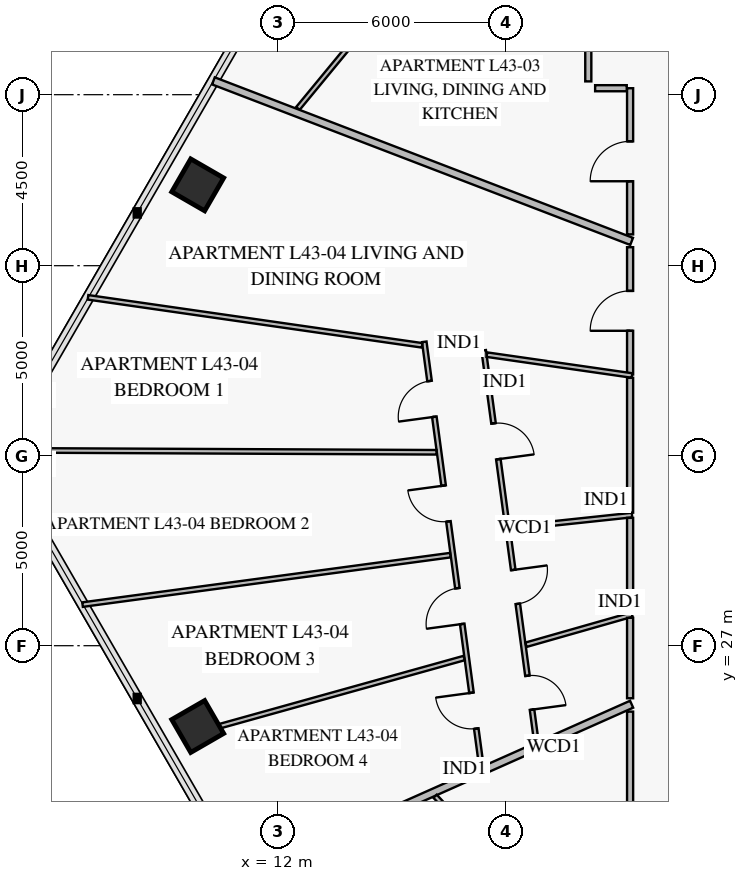
"""IFC4 building model, lengths in metres.
Left out: names, types, materials, properties, quantities, classifications, styles, units other than length and angle.
Written with IfcOpenShell. Run it as: python <this file> out.ifc"""

import sys

from ifc_helpers import new_model, si_unit, direction, frame, frame_2d, origin, origin_2d, place, context, subcontext, project, spatial, rectangle, extrude, element, fill, save


model = new_model("IFC4")
c1 = context("Model", 3, precision=1e-05, world=origin(), true_north=direction((0.0, 1.0)))
c2 = subcontext(c1, "Body", "Model", "MODEL_VIEW")
j1 = project(units=[si_unit("LENGTHUNIT", "METRE"), si_unit("PLANEANGLEUNIT", "RADIAN")], contexts=[c1])
p1 = place(None, origin())
s1 = spatial("IfcSite", under=j1, at=p1, CompositionType="ELEMENT")
p2 = place(p1, origin())
s2 = spatial("IfcBuilding", under=s1, at=p2, CompositionType="ELEMENT")
p3 = place(p2, frame((0.0, 0.0, 173.2)))
s3 = spatial("IfcBuildingStorey", under=s2, at=p3, CompositionType="ELEMENT", Elevation=173.2)
for number, where, z_axis, x_axis in (
    (1, (9.892, 39.126, 0.0), (0.0, 0.0, 1.0), (-0.5, -0.866, 0.0)),
    (2, (9.892, 24.874, 0.0), (0.0, 0.0, 1.0), (0.5, -0.866, 0.0)),
):
    element("IfcColumn", number, at=place(p3, frame(where, z_axis=z_axis, x_axis=x_axis)), inside=s3, PredefinedType="COLUMN", context=c2, shape_type="SweptSolid", body=[
        extrude(rectangle(XDim=1.0, YDim=1.0, at=origin_2d()), origin(), (0.0, 0.0, 1.0), 3.55),
    ])
p4 = place(p3, frame((19.43, 49.509, 0.0), z_axis=(0.0, 0.0, 1.0), x_axis=(-0.636077930037, -0.771624822643, 0.0)))
e3 = element("IfcWall", 3, at=p4, inside=s3, PredefinedType="PARTITIONING", context=c2, shape_type="SweptSolid", body=[
    extrude(rectangle(XDim=10.848, YDim=0.12, at=frame_2d((5.424, 0.0))), origin(), (0.0, 0.0, 1.0), 2.9),
])
p5 = place(p4, frame((4.949, 0.0, 0.0)))
e4 = element("IfcOpeningElement", 4, at=p5, cuts=e3, PredefinedType="OPENING", context=c2, shape_type="SweptSolid", body=[
    extrude(rectangle(XDim=0.95, YDim=2.1, at=frame_2d((0.475, 1.05))), frame((0.0, 0.072, 0.0), z_axis=(0.0, -1.0, 0.0), x_axis=(1.0, 0.0, 0.0)), (0.0, 0.0, 1.0), 0.144),
])
p6 = place(p3, frame((21.27, 41.67, 0.0), z_axis=(0.0, 0.0, 1.0), x_axis=(0.0, -1.0, 0.0)))
e5 = element("IfcWall", 5, at=p6, inside=s3, PredefinedType="PARTITIONING", context=c2, shape_type="SweptSolid", body=[
    extrude(rectangle(XDim=3.846, YDim=0.16, at=frame_2d((1.923, 0.0))), origin(), (0.0, 0.0, 1.0), 3.55),
])
p7 = place(p6, frame((1.398, 0.0, 0.0)))
e6 = element("IfcOpeningElement", 6, at=p7, cuts=e5, PredefinedType="OPENING", context=c2, shape_type="SweptSolid", body=[
    extrude(rectangle(XDim=1.05, YDim=2.15, at=frame_2d((0.525, 1.075))), frame((0.0, 0.092, 0.0), z_axis=(0.0, -1.0, 0.0), x_axis=(1.0, 0.0, 0.0)), (0.0, 0.0, 1.0), 0.184),
])
p8 = place(p3, frame((17.418, 34.772, 0.0), z_axis=(0.0, 0.0, 1.0), x_axis=(0.133300793384, -0.991075627025, 0.0)))
e7 = element("IfcWall", 7, at=p8, inside=s3, PredefinedType="PARTITIONING", context=c2, shape_type="SweptSolid", body=[
    extrude(rectangle(XDim=10.449, YDim=0.12, at=frame_2d((5.224, 0.0))), origin(), (0.0, 0.0, 1.0), 2.9),
])
p9 = place(p8, frame((1.94, 0.0, 0.0)))
e8 = element("IfcOpeningElement", 8, at=p9, cuts=e7, PredefinedType="OPENING", context=c2, shape_type="SweptSolid", body=[
    extrude(rectangle(XDim=0.95, YDim=2.1, at=frame_2d((0.475, 1.05))), frame((0.0, 0.072, 0.0), z_axis=(0.0, -1.0, 0.0), x_axis=(1.0, 0.0, 0.0)), (0.0, 0.0, 1.0), 0.144),
])
p10 = place(p8, frame((5.831, 0.0, 0.0)))
e9 = element("IfcOpeningElement", 9, at=p10, cuts=e7, PredefinedType="OPENING", context=c2, shape_type="SweptSolid", body=[
    extrude(rectangle(XDim=0.9, YDim=2.1, at=frame_2d((0.45, 1.05))), frame((0.0, 0.072, 0.0), z_axis=(0.0, -1.0, 0.0), x_axis=(1.0, 0.0, 0.0)), (0.0, 0.0, 1.0), 0.144),
])
p11 = place(p8, frame((8.64, 0.0, 0.0)))
e10 = element("IfcOpeningElement", 10, at=p11, cuts=e7, PredefinedType="OPENING", context=c2, shape_type="SweptSolid", body=[
    extrude(rectangle(XDim=0.9, YDim=2.1, at=frame_2d((0.45, 1.05))), frame((0.0, 0.072, 0.0), z_axis=(0.0, -1.0, 0.0), x_axis=(1.0, 0.0, 0.0)), (0.0, 0.0, 1.0), 0.144),
])
p12 = place(p3, frame((15.854, 34.997, 0.0), z_axis=(0.0, 0.0, 1.0), x_axis=(0.133279106394, -0.991078543708, 0.0)))
e11 = element("IfcWall", 11, at=p12, inside=s3, PredefinedType="PARTITIONING", context=c2, shape_type="SweptSolid", body=[
    extrude(rectangle(XDim=11.311, YDim=0.12, at=frame_2d((5.656, 0.0))), origin(), (0.0, 0.0, 1.0), 2.9),
])
p13 = place(p12, frame((1.042, 0.0, 0.0)))
e12 = element("IfcOpeningElement", 12, at=p13, cuts=e11, PredefinedType="OPENING", context=c2, shape_type="SweptSolid", body=[
    extrude(rectangle(XDim=0.95, YDim=2.1, at=frame_2d((0.475, 1.05))), frame((0.0, 0.072, 0.0), z_axis=(0.0, -1.0, 0.0), x_axis=(1.0, 0.0, 0.0)), (0.0, 0.0, 1.0), 0.144),
])
p14 = place(p12, frame((3.819, 0.0, 0.0)))
e13 = element("IfcOpeningElement", 13, at=p14, cuts=e11, PredefinedType="OPENING", context=c2, shape_type="SweptSolid", body=[
    extrude(rectangle(XDim=0.95, YDim=2.1, at=frame_2d((0.475, 1.05))), frame((0.0, 0.072, 0.0), z_axis=(0.0, -1.0, 0.0), x_axis=(1.0, 0.0, 0.0)), (0.0, 0.0, 1.0), 0.144),
])
p15 = place(p12, frame((6.542, 0.0, 0.0)))
e14 = element("IfcOpeningElement", 14, at=p15, cuts=e11, PredefinedType="OPENING", context=c2, shape_type="SweptSolid", body=[
    extrude(rectangle(XDim=0.95, YDim=2.1, at=frame_2d((0.475, 1.05))), frame((0.0, 0.072, 0.0), z_axis=(0.0, -1.0, 0.0), x_axis=(1.0, 0.0, 0.0)), (0.0, 0.0, 1.0), 0.144),
])
p16 = place(p12, frame((9.32, 0.0, 0.0)))
e15 = element("IfcOpeningElement", 15, at=p16, cuts=e11, PredefinedType="OPENING", context=c2, shape_type="SweptSolid", body=[
    extrude(rectangle(XDim=0.95, YDim=2.1, at=frame_2d((0.475, 1.05))), frame((0.0, 0.072, 0.0), z_axis=(0.0, -1.0, 0.0), x_axis=(1.0, 0.0, 0.0)), (0.0, 0.0, 1.0), 0.144),
])
p17 = place(p3, frame((21.27, 37.486, 0.0), z_axis=(0.0, 0.0, 1.0), x_axis=(0.0, -1.0, 0.0)))
e16 = element("IfcWall", 16, at=p17, inside=s3, PredefinedType="PARTITIONING", context=c2, shape_type="SweptSolid", body=[
    extrude(rectangle(XDim=3.348, YDim=0.16, at=frame_2d((1.674, 0.0))), origin(), (0.0, 0.0, 1.0), 2.9),
])
p18 = place(p17, frame((1.149, 0.0, 0.0)))
e17 = element("IfcOpeningElement", 17, at=p18, cuts=e16, PredefinedType="OPENING", context=c2, shape_type="SweptSolid", body=[
    extrude(rectangle(XDim=1.05, YDim=2.15, at=frame_2d((0.525, 1.075))), frame((0.0, 0.092, 0.0), z_axis=(0.0, -1.0, 0.0), x_axis=(1.0, 0.0, 0.0)), (0.0, 0.0, 1.0), 0.184),
])
p19 = place(p3, frame((21.31, 37.639, 0.0), z_axis=(0.0, 0.0, 1.0), x_axis=(-0.93357709865, 0.358376618762, 0.0)))
e18 = element("IfcWall", 18, at=p19, inside=s3, PredefinedType="PARTITIONING", context=c2, shape_type="SweptSolid", body=[
    extrude(rectangle(XDim=11.787, YDim=0.2, at=frame_2d((5.894, 0.0))), origin(), (0.0, 0.0, 1.0), 2.87),
])
p20 = place(p3, frame((21.32, 30.438, 0.0), z_axis=(0.0, 0.0, 1.0), x_axis=(-0.994376869396, -0.105899204953, 0.0)))
e19 = element("IfcWall", 19, at=p20, inside=s3, PredefinedType="PARTITIONING", context=c2, shape_type="SweptSolid", body=[
    extrude(rectangle(XDim=3.223, YDim=0.12, at=frame_2d((1.611, 0.0))), origin(), (0.0, 0.0, 1.0), 3.55),
])
p21 = place(p3, frame((21.32, 27.819, 0.0), z_axis=(0.0, 0.0, 1.0), x_axis=(-0.961771119413, -0.273854548737, 0.0)))
e20 = element("IfcWall", 20, at=p21, inside=s3, PredefinedType="PARTITIONING", context=c2, shape_type="SweptSolid", body=[
    extrude(rectangle(XDim=2.903, YDim=0.12, at=frame_2d((1.451, 0.0))), origin(), (0.0, 0.0, 1.0), 2.9),
])
p22 = place(p3, frame((16.176, 32.09, 0.0), z_axis=(0.0, 0.0, 1.0), x_axis=(-0.999989631639, 0.004553747245, 0.0)))
e21 = element("IfcWall", 21, at=p22, inside=s3, PredefinedType="PARTITIONING", context=c2, shape_type="SweptSolid", body=[
    extrude(rectangle(XDim=11.044, YDim=0.12, at=frame_2d((5.522, 0.0))), origin(), (0.0, 0.0, 1.0), 2.87),
])
p23 = place(p3, frame((16.54, 29.383, 0.0), z_axis=(0.0, 0.0, 1.0), x_axis=(-0.991077690838, -0.133285448281, 0.0)))
e22 = element("IfcWall", 22, at=p23, inside=s3, PredefinedType="PARTITIONING", context=c2, shape_type="SweptSolid", body=[
    extrude(rectangle(XDim=9.765, YDim=0.12, at=frame_2d((4.882, 0.0))), origin(), (0.0, 0.0, 1.0), 2.87),
])
p24 = place(p3, frame((16.904, 26.676, 0.0), z_axis=(0.0, 0.0, 1.0), x_axis=(-0.963259527587, -0.26857230407, 0.0)))
e23 = element("IfcWall", 23, at=p24, inside=s3, PredefinedType="PARTITIONING", context=c2, shape_type="SweptSolid", body=[
    extrude(rectangle(XDim=6.74, YDim=0.12, at=frame_2d((3.37, 0.0))), origin(), (0.0, 0.0, 1.0), 2.9),
])
p25 = place(p3, frame((21.32, 34.11, 0.0), z_axis=(0.0, 0.0, 1.0), x_axis=(-0.989818700467, 0.142333903923, 0.0)))
e24 = element("IfcWall", 24, at=p25, inside=s3, PredefinedType="PARTITIONING", context=c2, shape_type="SweptSolid", body=[
    extrude(rectangle(XDim=3.858, YDim=0.12, at=frame_2d((1.929, 0.0))), origin(), (0.0, 0.0, 1.0), 3.55),
])
p26 = place(p3, frame((15.798, 34.904, 0.0), z_axis=(0.0, 0.0, 1.0), x_axis=(-0.989827080259, 0.142275616979, 0.0)))
e25 = element("IfcWall", 25, at=p26, inside=s3, PredefinedType="PARTITIONING", context=c2, shape_type="SweptSolid", body=[
    extrude(rectangle(XDim=8.882, YDim=0.12, at=frame_2d((4.441, 0.0))), origin(), (0.0, 0.0, 1.0), 2.87),
])
p27 = place(p3, frame((21.31, 25.46, 0.0), z_axis=(0.0, 0.0, 1.0), x_axis=(-0.913543837416, -0.406740282146, 0.0)))
e26 = element("IfcWall", 26, at=p27, inside=s3, PredefinedType="PARTITIONING", context=c2, shape_type="SweptSolid", body=[
    extrude(rectangle(XDim=11.253, YDim=0.2, at=frame_2d((5.626, 0.0))), origin(), (0.0, 0.0, 1.0), 2.87),
])
p28 = place(p3, frame((16.138, 23.039, 0.0), z_axis=(0.0, 0.0, 1.0), x_axis=(0.682000707563, -0.731351512532, 0.0)))
e27 = element("IfcWall", 27, at=p28, inside=s3, PredefinedType="PARTITIONING", context=c2, shape_type="SweptSolid", body=[
    extrude(rectangle(XDim=3.562, YDim=0.12, at=frame_2d((1.781, 0.0))), origin(), (0.0, 0.0, 1.0), 3.55),
])
p29 = place(p3, frame((20.17, 45.55, 0.0), z_axis=(0.0, 0.0, 1.0), x_axis=(0.0, -1.0, 0.0)))
e28 = element("IfcWall", 28, at=p29, inside=s3, PredefinedType="PARTITIONING", context=c2, shape_type="SweptSolid", body=[
    extrude(rectangle(XDim=3.7, YDim=0.16, at=frame_2d((1.85, 0.0))), origin(), (0.0, 0.0, 1.0), 3.15),
])
p30 = place(p3, frame((20.35, 41.67, 0.0), z_axis=(0.0, 0.0, 1.0), x_axis=(1.0, 0.0, 0.0)))
e29 = element("IfcWall", 29, at=p30, inside=s3, PredefinedType="PARTITIONING", context=c2, shape_type="SweptSolid", body=[
    extrude(rectangle(XDim=0.832, YDim=0.16, at=frame_2d((0.416, 0.0))), origin(), (0.0, 0.0, 1.0), 3.55),
])
p31 = place(p3, frame((21.27, 34.049, 0.0), z_axis=(0.0, 0.0, 1.0), x_axis=(0.0, -1.0, 0.0)))
e30 = element("IfcWall", 30, at=p31, inside=s3, PredefinedType="PARTITIONING", context=c2, shape_type="SweptSolid", body=[
    extrude(rectangle(XDim=3.548, YDim=0.16, at=frame_2d((1.774, 0.0))), origin(), (0.0, 0.0, 1.0), 3.55),
])
p32 = place(p3, frame((21.27, 30.364, 0.0), z_axis=(0.0, 0.0, 1.0), x_axis=(0.0, -1.0, 0.0)))
e31 = element("IfcWall", 31, at=p32, inside=s3, PredefinedType="PARTITIONING", context=c2, shape_type="SweptSolid", body=[
    extrude(rectangle(XDim=2.488, YDim=0.16, at=frame_2d((1.244, 0.0))), origin(), (0.0, 0.0, 1.0), 2.9),
])
p33 = place(p3, frame((21.27, 27.734, 0.0), z_axis=(0.0, 0.0, 1.0), x_axis=(0.0, -1.0, 0.0)))
e32 = element("IfcWall", 32, at=p33, inside=s3, PredefinedType="PARTITIONING", context=c2, shape_type="SweptSolid", body=[
    extrude(rectangle(XDim=2.117, YDim=0.16, at=frame_2d((1.059, 0.0))), origin(), (0.0, 0.0, 1.0), 3.55),
])
p34 = place(p3, frame((21.27, 25.265, 0.0), z_axis=(0.0, 0.0, 1.0), x_axis=(0.0, -1.0, 0.0)))
e33 = element("IfcWall", 33, at=p34, inside=s3, PredefinedType="PARTITIONING", context=c2, shape_type="SweptSolid", body=[
    extrude(rectangle(XDim=2.935, YDim=0.16, at=frame_2d((1.468, 0.0))), origin(), (0.0, 0.0, 1.0), 3.55),
])
p35 = place(p7, frame((1.05, 0.0, 0.0), z_axis=(0.0, 0.0, 1.0), x_axis=(-1.0, 0.0, 0.0)))
e34 = element("IfcDoor", 34, at=p35, inside=s3, OperationType="SINGLE_SWING_LEFT", PredefinedType="DOOR", context=c2, shape_type="SweptSolid", body=[
    extrude(rectangle(XDim=1.05, YDim=2.15, at=frame_2d((0.525, 1.075))), frame((0.0, 0.025, 0.0), z_axis=(0.0, -1.0, 0.0), x_axis=(1.0, 0.0, 0.0)), (0.0, 0.0, 1.0), 0.05),
])
fill(e6, e34)
p36 = place(p9, origin())
e35 = element("IfcDoor", 35, at=p36, inside=s3, OperationType="SINGLE_SWING_RIGHT", PredefinedType="DOOR", context=c2, shape_type="SweptSolid", body=[
    extrude(rectangle(XDim=0.95, YDim=2.1, at=frame_2d((0.475, 1.05))), frame((0.0, 0.025, 0.0), z_axis=(0.0, -1.0, 0.0), x_axis=(1.0, 0.0, 0.0)), (0.0, 0.0, 1.0), 0.05),
])
fill(e8, e35)
p37 = place(p10, origin())
e36 = element("IfcDoor", 36, at=p37, inside=s3, OperationType="SINGLE_SWING_LEFT", PredefinedType="DOOR", context=c2, shape_type="SweptSolid", body=[
    extrude(rectangle(XDim=0.9, YDim=2.1, at=frame_2d((0.45, 1.05))), frame((0.0, 0.025, 0.0), z_axis=(0.0, -1.0, 0.0), x_axis=(1.0, 0.0, 0.0)), (0.0, 0.0, 1.0), 0.05),
])
fill(e9, e36)
p38 = place(p11, origin())
e37 = element("IfcDoor", 37, at=p38, inside=s3, OperationType="SINGLE_SWING_RIGHT", PredefinedType="DOOR", context=c2, shape_type="SweptSolid", body=[
    extrude(rectangle(XDim=0.9, YDim=2.1, at=frame_2d((0.45, 1.05))), frame((0.0, 0.025, 0.0), z_axis=(0.0, -1.0, 0.0), x_axis=(1.0, 0.0, 0.0)), (0.0, 0.0, 1.0), 0.05),
])
fill(e10, e37)
p39 = place(p13, frame((0.95, 0.0, 0.0), z_axis=(0.0, 0.0, 1.0), x_axis=(-1.0, 0.0, 0.0)))
e38 = element("IfcDoor", 38, at=p39, inside=s3, OperationType="SINGLE_SWING_LEFT", PredefinedType="DOOR", context=c2, shape_type="SweptSolid", body=[
    extrude(rectangle(XDim=0.95, YDim=2.1, at=frame_2d((0.475, 1.05))), frame((0.0, 0.025, 0.0), z_axis=(0.0, -1.0, 0.0), x_axis=(1.0, 0.0, 0.0)), (0.0, 0.0, 1.0), 0.05),
])
fill(e12, e38)
p40 = place(p14, frame((0.95, 0.0, 0.0), z_axis=(0.0, 0.0, 1.0), x_axis=(-1.0, 0.0, 0.0)))
e39 = element("IfcDoor", 39, at=p40, inside=s3, OperationType="SINGLE_SWING_RIGHT", PredefinedType="DOOR", context=c2, shape_type="SweptSolid", body=[
    extrude(rectangle(XDim=0.95, YDim=2.1, at=frame_2d((0.475, 1.05))), frame((0.0, 0.025, 0.0), z_axis=(0.0, -1.0, 0.0), x_axis=(1.0, 0.0, 0.0)), (0.0, 0.0, 1.0), 0.05),
])
fill(e13, e39)
p41 = place(p15, frame((0.95, 0.0, 0.0), z_axis=(0.0, 0.0, 1.0), x_axis=(-1.0, 0.0, 0.0)))
e40 = element("IfcDoor", 40, at=p41, inside=s3, OperationType="SINGLE_SWING_LEFT", PredefinedType="DOOR", context=c2, shape_type="SweptSolid", body=[
    extrude(rectangle(XDim=0.95, YDim=2.1, at=frame_2d((0.475, 1.05))), frame((0.0, 0.025, 0.0), z_axis=(0.0, -1.0, 0.0), x_axis=(1.0, 0.0, 0.0)), (0.0, 0.0, 1.0), 0.05),
])
fill(e14, e40)
p42 = place(p16, frame((0.95, 0.0, 0.0), z_axis=(0.0, 0.0, 1.0), x_axis=(-1.0, 0.0, 0.0)))
e41 = element("IfcDoor", 41, at=p42, inside=s3, OperationType="SINGLE_SWING_RIGHT", PredefinedType="DOOR", context=c2, shape_type="SweptSolid", body=[
    extrude(rectangle(XDim=0.95, YDim=2.1, at=frame_2d((0.475, 1.05))), frame((0.0, 0.025, 0.0), z_axis=(0.0, -1.0, 0.0), x_axis=(1.0, 0.0, 0.0)), (0.0, 0.0, 1.0), 0.05),
])
fill(e15, e41)
p43 = place(p18, frame((1.05, 0.0, 0.0), z_axis=(0.0, 0.0, 1.0), x_axis=(-1.0, 0.0, 0.0)))
e42 = element("IfcDoor", 42, at=p43, inside=s3, OperationType="SINGLE_SWING_LEFT", PredefinedType="DOOR", context=c2, shape_type="SweptSolid", body=[
    extrude(rectangle(XDim=1.05, YDim=2.15, at=frame_2d((0.525, 1.075))), frame((0.0, 0.025, 0.0), z_axis=(0.0, -1.0, 0.0), x_axis=(1.0, 0.0, 0.0)), (0.0, 0.0, 1.0), 0.05),
])
fill(e17, e42)
save(model, sys.argv[1])
